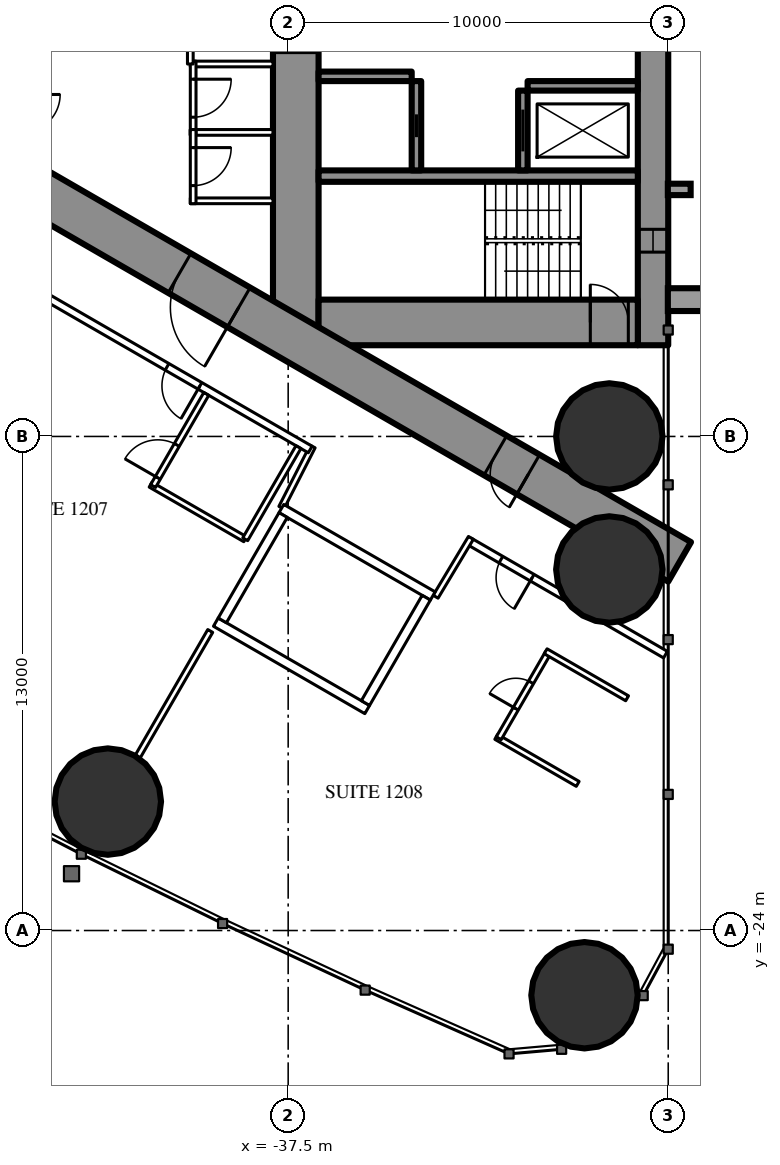
"""IFC4 building model, lengths in metres.
Left out: names, types, materials, properties, quantities, classifications, styles, units other than length and angle.
Written with IfcOpenShell. Run it as: python <this file> out.ifc"""

import sys

from ifc_helpers import new_model, si_unit, direction, frame, frame_2d, origin, origin_2d, place, context, subcontext, project, spatial, rectangle, hollow_circle, extrude, element, fill, save


model = new_model("IFC4")
c1 = context("Model", 3, precision=1e-05, world=origin(), true_north=direction((0.0, 1.0)))
c2 = subcontext(c1, "Body", "Model", "MODEL_VIEW")
j1 = project(units=[si_unit("LENGTHUNIT", "METRE"), si_unit("PLANEANGLEUNIT", "RADIAN")], contexts=[c1])
p1 = place(None, origin())
s1 = spatial("IfcSite", under=j1, at=p1, CompositionType="ELEMENT")
p2 = place(p1, origin())
s2 = spatial("IfcBuilding", under=s1, at=p2, CompositionType="ELEMENT")
p3 = place(p2, frame((0.0, 0.0, 49.5)))
s3 = spatial("IfcBuildingStorey", under=s2, at=p3, CompositionType="ELEMENT", Elevation=49.5)
for number, where, z_axis, x_axis in (
    (1, (-29.703, -25.703, 0.0), (0.0, 0.0, 1.0), (1.0, 0.0, 0.0)),
    (2, (-29.05, -11.0, 0.0), (0.0, 0.0, 1.0), (1.0, 0.0, 0.0)),
    (3, (-29.05, -14.5, 0.0), (0.0, 0.0, 1.0), (1.0, 0.0, 0.0)),
    (4, (-42.245, -20.607, 0.0), (0.0, 0.0, 1.0), (1.0, 0.0, 0.0)),
):
    element("IfcColumn", number, at=place(p3, frame(where, z_axis=z_axis, x_axis=x_axis)), inside=s3, PredefinedType="COLUMN", context=c2, shape_type="SweptSolid", body=[
        extrude(hollow_circle(Radius=1.4, WallThickness=0.12, at=origin_2d()), origin(), (0.0, 0.0, 1.0), 3.5),
    ])
p4 = place(p3, frame((-27.9, 8.6, 0.0), z_axis=(0.0, 0.0, 1.0), x_axis=(0.0, -1.0, 0.0)))
e5 = element("IfcWall", 5, at=p4, inside=s3, PredefinedType="SHEAR", context=c2, shape_type="SweptSolid", body=[
    extrude(rectangle(XDim=17.2, YDim=0.8, at=frame_2d((8.6, 0.0))), origin(), (0.0, 0.0, 1.0), 3.5),
])
p5 = place(p4, frame((2.45, 0.0, 0.6)))
e6 = element("IfcOpeningElement", 6, at=p5, cuts=e5, PredefinedType="OPENING", context=c2, shape_type="SweptSolid", body=[
    extrude(rectangle(XDim=0.6, YDim=2.1, at=frame_2d((0.3, 1.05))), frame((0.0, 0.41, 0.0), z_axis=(0.0, -1.0, 0.0), x_axis=(1.0, 0.0, 0.0)), (0.0, 0.0, 1.0), 0.82),
])
p6 = place(p4, frame((14.15, 0.0, 0.6)))
e7 = element("IfcOpeningElement", 7, at=p6, cuts=e5, PredefinedType="OPENING", context=c2, shape_type="SweptSolid", body=[
    extrude(rectangle(XDim=0.6, YDim=2.1, at=frame_2d((0.3, 1.05))), frame((0.0, 0.41, 0.0), z_axis=(0.0, -1.0, 0.0), x_axis=(1.0, 0.0, 0.0)), (0.0, 0.0, 1.0), 0.82),
])
p7 = place(p3, frame((-37.3, 8.6, 0.0), z_axis=(0.0, 0.0, 1.0), x_axis=(0.0, -1.0, 0.0)))
e8 = element("IfcWall", 8, at=p7, inside=s3, PredefinedType="SHEAR", context=c2, shape_type="SweptSolid", body=[
    extrude(rectangle(XDim=17.2, YDim=1.2, at=frame_2d((8.6, 0.0))), origin(), (0.0, 0.0, 1.0), 3.5),
])
p8 = place(p7, frame((7.7, 0.0, 0.0)))
e9 = element("IfcOpeningElement", 9, at=p8, cuts=e8, PredefinedType="OPENING", context=c2, shape_type="SweptSolid", body=[
    extrude(rectangle(XDim=1.8, YDim=2.2, at=frame_2d((0.9, 1.1))), frame((0.0, 0.61, 0.0), z_axis=(0.0, -1.0, 0.0), x_axis=(1.0, 0.0, 0.0)), (0.0, 0.0, 1.0), 1.22),
])
p9 = place(p3, frame((-28.3, -8.0, 0.0), z_axis=(0.0, 0.0, 1.0), x_axis=(-1.0, 0.0, 0.0)))
e10 = element("IfcWall", 10, at=p9, inside=s3, PredefinedType="SHEAR", context=c2, shape_type="SweptSolid", body=[
    extrude(rectangle(XDim=8.4, YDim=1.2, at=frame_2d((4.2, 0.0))), origin(), (0.0, 0.0, 1.0), 3.5),
])
p10 = place(p9, frame((0.25, 0.0, 0.0)))
e11 = element("IfcOpeningElement", 11, at=p10, cuts=e10, PredefinedType="OPENING", context=c2, shape_type="SweptSolid", body=[
    extrude(rectangle(XDim=1.0, YDim=2.2, at=frame_2d((0.5, 1.1))), frame((0.0, 0.61, 0.0), z_axis=(0.0, -1.0, 0.0), x_axis=(1.0, 0.0, 0.0)), (0.0, 0.0, 1.0), 1.22),
])
p11 = place(p3, frame((-28.3, -4.15, 0.0), z_axis=(0.0, 0.0, 1.0), x_axis=(-1.0, 0.0, 0.0)))
e12 = element("IfcWall", 12, at=p11, inside=s3, PredefinedType="SHEAR", context=c2, shape_type="SweptSolid", body=[
    extrude(rectangle(XDim=8.4, YDim=0.3, at=frame_2d((4.2, 0.0))), origin(), (0.0, 0.0, 1.0), 3.5),
])
p12 = place(p3, frame((-31.325, -1.9, 0.0), z_axis=(0.0, 0.0, 1.0), x_axis=(0.0, -1.0, 0.0)))
e13 = element("IfcWall", 13, at=p12, inside=s3, PredefinedType="SHEAR", context=c2, shape_type="SweptSolid", body=[
    extrude(rectangle(XDim=2.1, YDim=0.25, at=frame_2d((1.05, 0.0))), origin(), (0.0, 0.0, 1.0), 3.5),
])
p13 = place(p12, frame((0.5, 0.0, 0.0)))
e14 = element("IfcOpeningElement", 14, at=p13, cuts=e13, PredefinedType="OPENING", context=c2, shape_type="SweptSolid", body=[
    extrude(rectangle(XDim=1.1, YDim=2.2, at=frame_2d((0.55, 1.1))), frame((0.0, 0.135, 0.0), z_axis=(0.0, -1.0, 0.0), x_axis=(1.0, 0.0, 0.0)), (0.0, 0.0, 1.0), 0.27),
])
p14 = place(p3, frame((-34.125, -1.65, 0.0), z_axis=(0.0, 0.0, 1.0), x_axis=(0.0, -1.0, 0.0)))
e15 = element("IfcWall", 15, at=p14, inside=s3, PredefinedType="SHEAR", context=c2, shape_type="SweptSolid", body=[
    extrude(rectangle(XDim=2.35, YDim=0.25, at=frame_2d((1.175, 0.0))), origin(), (0.0, 0.0, 1.0), 3.5),
])
p15 = place(p14, frame((0.875, 0.0, 0.0)))
e16 = element("IfcOpeningElement", 16, at=p15, cuts=e15, PredefinedType="OPENING", context=c2, shape_type="SweptSolid", body=[
    extrude(rectangle(XDim=0.6, YDim=2.0, at=frame_2d((0.3, 1.0))), frame((0.0, 0.135, 0.0), z_axis=(0.0, -1.0, 0.0), x_axis=(1.0, 0.0, 0.0)), (0.0, 0.0, 1.0), 0.27),
])
p16 = place(p3, frame((-28.3, -1.775, 0.0), z_axis=(0.0, 0.0, 1.0), x_axis=(-1.0, 0.0, 0.0)))
e17 = element("IfcWall", 17, at=p16, inside=s3, PredefinedType="SHEAR", context=c2, shape_type="SweptSolid", body=[
    extrude(rectangle(XDim=2.9, YDim=0.25, at=frame_2d((1.45, 0.0))), origin(), (0.0, 0.0, 1.0), 3.5),
])
p17 = place(p3, frame((-34.25, -1.525, 0.0), z_axis=(0.0, 0.0, 1.0), x_axis=(-1.0, 0.0, 0.0)))
e18 = element("IfcWall", 18, at=p17, inside=s3, PredefinedType="SHEAR", context=c2, shape_type="SweptSolid", body=[
    extrude(rectangle(XDim=2.45, YDim=0.25, at=frame_2d((1.225, 0.0))), origin(), (0.0, 0.0, 1.0), 3.5),
])
p18 = place(p3, frame((-27.2, -14.3, 0.0), z_axis=(0.0, 0.0, 1.0), x_axis=(-0.866024021859, 0.500002393557, 0.0)))
e19 = element("IfcWall", 19, at=p18, inside=s3, PredefinedType="SHEAR", context=c2, shape_type="SweptSolid", body=[
    extrude(rectangle(XDim=27.907, YDim=1.2, at=frame_2d((13.954, 0.0))), origin(), (0.0, 0.0, 1.0), 3.5),
])
p19 = place(p18, frame((4.6, 0.0, 0.0)))
e20 = element("IfcOpeningElement", 20, at=p19, cuts=e19, PredefinedType="OPENING", context=c2, shape_type="SweptSolid", body=[
    extrude(rectangle(XDim=1.0, YDim=2.2, at=frame_2d((0.5, 1.1))), frame((0.0, 0.61, 0.0), z_axis=(0.0, -1.0, 0.0), x_axis=(1.0, 0.0, 0.0)), (0.0, 0.0, 1.0), 1.22),
])
p20 = place(p18, frame((13.395, 0.0, 0.0)))
e21 = element("IfcOpeningElement", 21, at=p20, cuts=e19, PredefinedType="OPENING", context=c2, shape_type="SweptSolid", body=[
    extrude(rectangle(XDim=1.8, YDim=2.2, at=frame_2d((0.9, 1.1))), frame((0.0, 0.61, 0.0), z_axis=(0.0, -1.0, 0.0), x_axis=(1.0, 0.0, 0.0)), (0.0, 0.0, 1.0), 1.22),
])
p21 = place(p3, frame((-39.551, -16.118, 0.0), z_axis=(0.0, 0.0, 1.0), x_axis=(-0.499986503906, -0.866033195618, 0.0)))
e22 = element("IfcWall", 22, at=p21, inside=s3, PredefinedType="PARTITIONING", context=c2, shape_type="SweptSolid", body=[
    extrude(rectangle(XDim=3.815, YDim=0.15, at=frame_2d((1.907, 0.0))), origin(), (0.0, 0.0, 1.0), 3.25),
])
p22 = place(p3, frame((-27.572, -16.741, 0.0), z_axis=(0.0, 0.0, 1.0), x_axis=(-0.866024464444, 0.500001626982, 0.0)))
e23 = element("IfcWall", 23, at=p22, inside=s3, PredefinedType="PARTITIONING", context=c2, shape_type="SweptSolid", body=[
    extrude(rectangle(XDim=5.955, YDim=0.2, at=frame_2d((2.978, 0.0))), origin(), (0.0, 0.0, 1.0), 3.25),
])
p23 = place(p22, frame((4.05, 0.0, 0.0)))
e24 = element("IfcOpeningElement", 24, at=p23, cuts=e23, PredefinedType="OPENING", context=c2, shape_type="SweptSolid", body=[
    extrude(rectangle(XDim=0.95, YDim=2.2, at=frame_2d((0.475, 1.1))), frame((0.0, 0.11, 0.0), z_axis=(0.0, -1.0, 0.0), x_axis=(1.0, 0.0, 0.0)), (0.0, 0.0, 1.0), 0.22),
])
p24 = place(p3, frame((-36.857, -11.265, 0.0), z_axis=(0.0, 0.0, 1.0), x_axis=(-0.454225294761, -0.890886851176, 0.0)))
e25 = element("IfcWall", 25, at=p24, inside=s3, PredefinedType="PARTITIONING", context=c2, shape_type="SweptSolid", body=[
    extrude(rectangle(XDim=1.807, YDim=0.15, at=frame_2d((0.904, 0.0))), origin(), (0.0, 0.0, 1.0), 3.25),
])
p25 = place(p3, frame((-33.621, -15.218, 0.0), z_axis=(0.0, 0.0, 1.0), x_axis=(0.514336634837, 0.857588377991, 0.0)))
e26 = element("IfcWall", 26, at=p25, inside=s3, PredefinedType="PARTITIONING", context=c2, shape_type="SweptSolid", body=[
    extrude(rectangle(XDim=1.805, YDim=0.15, at=frame_2d((0.903, 0.0))), origin(), (0.0, 0.0, 1.0), 3.25),
])
p26 = place(p3, frame((-36.92, -11.344, 0.0), z_axis=(0.0, 0.0, 1.0), x_axis=(-0.866025017052, 0.500000669839, 0.0)))
e27 = element("IfcWall", 27, at=p26, inside=s3, PredefinedType="PARTITIONING", context=c2, shape_type="SweptSolid", body=[
    extrude(rectangle(XDim=12.28, YDim=0.2, at=frame_2d((6.14, 0.0))), origin(), (0.0, 0.0, 1.0), 3.25),
])
p27 = place(p26, frame((3.35, 0.0, 0.0)))
e28 = element("IfcOpeningElement", 28, at=p27, cuts=e27, PredefinedType="OPENING", context=c2, shape_type="SweptSolid", body=[
    extrude(rectangle(XDim=1.0, YDim=2.2, at=frame_2d((0.5, 1.1))), frame((0.0, 0.11, 0.0), z_axis=(0.0, -1.0, 0.0), x_axis=(1.0, 0.0, 0.0)), (0.0, 0.0, 1.0), 0.22),
])
p28 = place(p3, frame((-38.63, -13.705, 0.0), z_axis=(0.0, 0.0, 1.0), x_axis=(-0.866018712932, 0.500011588718, 0.0)))
e29 = element("IfcWall", 29, at=p28, inside=s3, PredefinedType="PARTITIONING", context=c2, shape_type="SweptSolid", body=[
    extrude(rectangle(XDim=2.875, YDim=0.15, at=frame_2d((1.438, 0.0))), origin(), (0.0, 0.0, 1.0), 3.25),
])
p29 = place(p3, frame((-39.655, -9.88, 0.0), z_axis=(0.0, 0.0, 1.0), x_axis=(-0.500049511043, -0.865996816683, 0.0)))
e30 = element("IfcWall", 30, at=p29, inside=s3, PredefinedType="PARTITIONING", context=c2, shape_type="SweptSolid", body=[
    extrude(rectangle(XDim=2.8, YDim=0.15, at=frame_2d((1.4, 0.0))), origin(), (0.0, 0.0, 1.0), 3.25),
])
p30 = place(p29, frame((1.55, 0.0, 0.0)))
e31 = element("IfcOpeningElement", 31, at=p30, cuts=e30, PredefinedType="OPENING", context=c2, shape_type="SweptSolid", body=[
    extrude(rectangle(XDim=1.0, YDim=2.2, at=frame_2d((0.5, 1.1))), frame((0.0, 0.085, 0.0), z_axis=(0.0, -1.0, 0.0), x_axis=(1.0, 0.0, 0.0)), (0.0, 0.0, 1.0), 0.17),
])
p31 = place(p3, frame((-37.23, -11.281, 0.0), z_axis=(0.0, 0.0, 1.0), x_axis=(-0.500049511043, -0.865996816683, 0.0)))
e32 = element("IfcWall", 32, at=p31, inside=s3, PredefinedType="PARTITIONING", context=c2, shape_type="SweptSolid", body=[
    extrude(rectangle(XDim=2.8, YDim=0.15, at=frame_2d((1.4, 0.0))), origin(), (0.0, 0.0, 1.0), 3.25),
])
p32 = place(p3, frame((-29.882, -20.142, 0.0), z_axis=(0.0, 0.0, 1.0), x_axis=(-0.866031185235, 0.4999899861, 0.0)))
e33 = element("IfcWall", 33, at=p32, inside=s3, PredefinedType="PARTITIONING", context=c2, shape_type="SweptSolid", body=[
    extrude(rectangle(XDim=2.475, YDim=0.15, at=frame_2d((1.238, 0.0))), origin(), (0.0, 0.0, 1.0), 3.25),
])
p33 = place(p3, frame((-30.66, -16.69, 0.0), z_axis=(0.0, 0.0, 1.0), x_axis=(-0.499936506574, -0.866062058628, 0.0)))
e34 = element("IfcWall", 34, at=p33, inside=s3, PredefinedType="PARTITIONING", context=c2, shape_type="SweptSolid", body=[
    extrude(rectangle(XDim=2.6, YDim=0.15, at=frame_2d((1.3, 0.0))), origin(), (0.0, 0.0, 1.0), 3.25),
])
p34 = place(p33, frame((0.9, 0.0, 0.0)))
e35 = element("IfcOpeningElement", 35, at=p34, cuts=e34, PredefinedType="OPENING", context=c2, shape_type="SweptSolid", body=[
    extrude(rectangle(XDim=0.8, YDim=2.2, at=frame_2d((0.4, 1.1))), frame((0.0, 0.085, 0.0), z_axis=(0.0, -1.0, 0.0), x_axis=(1.0, 0.0, 0.0)), (0.0, 0.0, 1.0), 0.17),
])
p35 = place(p3, frame((-28.582, -17.89, 0.0), z_axis=(0.0, 0.0, 1.0), x_axis=(-0.866073894602, 0.499916002032, 0.0)))
e36 = element("IfcWall", 36, at=p35, inside=s3, PredefinedType="PARTITIONING", context=c2, shape_type="SweptSolid", body=[
    extrude(rectangle(XDim=2.475, YDim=0.15, at=frame_2d((1.238, 0.0))), origin(), (0.0, 0.0, 1.0), 3.25),
])
for number, where, z_axis, x_axis in (
    (37, (-37.9, -1.2, 0.0), (0.0, 0.0, 1.0), (-1.0, 0.0, 0.0)),
    (38, (-37.9, -3.0, 0.0), (0.0, 0.0, 1.0), (-1.0, 0.0, 0.0)),
    (39, (-37.9, -4.8, 0.0), (0.0, 0.0, 1.0), (-1.0, 0.0, 0.0)),
):
    element("IfcWall", number, at=place(p3, frame(where, z_axis=z_axis, x_axis=x_axis)), inside=s3, PredefinedType="PARTITIONING", context=c2, shape_type="SweptSolid", body=[
        extrude(rectangle(XDim=2.175, YDim=0.15, at=frame_2d((1.087, 0.0))), origin(), (0.0, 0.0, 1.0), 3.25),
    ])
p36 = place(p3, frame((-40.0, -1.125, 0.0), z_axis=(0.0, 0.0, 1.0), x_axis=(0.0, -1.0, 0.0)))
e40 = element("IfcWall", 40, at=p36, inside=s3, PredefinedType="PARTITIONING", context=c2, shape_type="SweptSolid", body=[
    extrude(rectangle(XDim=1.95, YDim=0.15, at=frame_2d((0.975, 0.0))), origin(), (0.0, 0.0, 1.0), 3.25),
])
p37 = place(p36, frame((0.475, 0.0, 0.0)))
e41 = element("IfcOpeningElement", 41, at=p37, cuts=e40, PredefinedType="OPENING", context=c2, shape_type="SweptSolid", body=[
    extrude(rectangle(XDim=1.0, YDim=2.2, at=frame_2d((0.5, 1.1))), frame((0.0, 0.085, 0.0), z_axis=(0.0, -1.0, 0.0), x_axis=(1.0, 0.0, 0.0)), (0.0, 0.0, 1.0), 0.17),
])
p38 = place(p3, frame((-40.0, -2.925, 0.0), z_axis=(0.0, 0.0, 1.0), x_axis=(0.0, -1.0, 0.0)))
e42 = element("IfcWall", 42, at=p38, inside=s3, PredefinedType="PARTITIONING", context=c2, shape_type="SweptSolid", body=[
    extrude(rectangle(XDim=1.95, YDim=0.15, at=frame_2d((0.975, 0.0))), origin(), (0.0, 0.0, 1.0), 3.25),
])
p39 = place(p38, frame((0.475, 0.0, 0.0)))
e43 = element("IfcOpeningElement", 43, at=p39, cuts=e42, PredefinedType="OPENING", context=c2, shape_type="SweptSolid", body=[
    extrude(rectangle(XDim=1.0, YDim=2.2, at=frame_2d((0.5, 1.1))), frame((0.0, 0.085, 0.0), z_axis=(0.0, -1.0, 0.0), x_axis=(1.0, 0.0, 0.0)), (0.0, 0.0, 1.0), 0.17),
])
p40 = place(p3, frame((-40.075, 6.174, 0.0), z_axis=(0.0, 0.0, 1.0), x_axis=(0.0, -1.0, 0.0)))
e44 = element("IfcWall", 44, at=p40, inside=s3, PredefinedType="PARTITIONING", context=c2, shape_type="SweptSolid", body=[
    extrude(rectangle(XDim=7.374, YDim=0.15, at=frame_2d((3.687, 0.0))), origin(), (0.0, 0.0, 1.0), 3.25),
])
p41 = place(p40, frame((2.787, 0.0, 0.0)))
e45 = element("IfcOpeningElement", 45, at=p41, cuts=e44, PredefinedType="OPENING", context=c2, shape_type="SweptSolid", body=[
    extrude(rectangle(XDim=1.8, YDim=2.2, at=frame_2d((0.9, 1.1))), frame((0.0, 0.085, 0.0), z_axis=(0.0, -1.0, 0.0), x_axis=(1.0, 0.0, 0.0)), (0.0, 0.0, 1.0), 0.17),
])
p42 = place(p3, frame((-33.696, -15.197, 0.0), z_axis=(0.0, 0.0, 1.0), x_axis=(-0.865976953817, 0.500083908417, 0.0)))
e46 = element("IfcWall", 46, at=p42, inside=s3, PredefinedType="PARTITIONING", context=c2, shape_type="SweptSolid", body=[
    extrude(rectangle(XDim=4.599, YDim=0.25, at=frame_2d((2.3, 0.0))), origin(), (0.0, 0.0, 1.0), 3.25),
])
p43 = place(p3, frame((-35.42, -18.186, 0.0), z_axis=(0.0, 0.0, 1.0), x_axis=(-0.865990227814, 0.50006092162, 0.0)))
e47 = element("IfcWall", 47, at=p43, inside=s3, PredefinedType="PARTITIONING", context=c2, shape_type="SweptSolid", body=[
    extrude(rectangle(XDim=4.6, YDim=0.25, at=frame_2d((2.3, 0.0))), origin(), (0.0, 0.0, 1.0), 3.25),
])
p44 = place(p3, frame((-33.866, -15.243, 0.0), z_axis=(0.0, 0.0, 1.0), x_axis=(-0.499929347863, -0.866066190972, 0.0)))
e48 = element("IfcWall", 48, at=p44, inside=s3, PredefinedType="PARTITIONING", context=c2, shape_type="SweptSolid", body=[
    extrude(rectangle(XDim=3.201, YDim=0.25, at=frame_2d((1.6, 0.0))), origin(), (0.0, 0.0, 1.0), 3.25),
])
p45 = place(p3, frame((-37.633, -13.068, 0.0), z_axis=(0.0, 0.0, 1.0), x_axis=(-0.499872130319, -0.866099216793, 0.0)))
e49 = element("IfcWall", 49, at=p45, inside=s3, PredefinedType="PARTITIONING", context=c2, shape_type="SweptSolid", body=[
    extrude(rectangle(XDim=3.2, YDim=0.25, at=frame_2d((1.6, 0.0))), origin(), (0.0, 0.0, 1.0), 3.25),
])
p46 = place(p30, origin())
e50 = element("IfcDoor", 50, at=p46, inside=s3, OperationType="SINGLE_SWING_RIGHT", PredefinedType="DOOR", context=c2, shape_type="SweptSolid", body=[
    extrude(rectangle(XDim=1.0, YDim=2.2, at=frame_2d((0.5, 1.1))), frame((0.0, 0.025, 0.0), z_axis=(0.0, -1.0, 0.0), x_axis=(1.0, 0.0, 0.0)), (0.0, 0.0, 1.0), 0.05),
])
fill(e31, e50)
p47 = place(p27, origin())
e51 = element("IfcDoor", 51, at=p47, inside=s3, OperationType="SINGLE_SWING_LEFT", PredefinedType="DOOR", context=c2, shape_type="SweptSolid", body=[
    extrude(rectangle(XDim=1.0, YDim=2.2, at=frame_2d((0.5, 1.1))), frame((0.0, 0.025, 0.0), z_axis=(0.0, -1.0, 0.0), x_axis=(1.0, 0.0, 0.0)), (0.0, 0.0, 1.0), 0.05),
])
fill(e28, e51)
p48 = place(p34, origin())
e52 = element("IfcDoor", 52, at=p48, inside=s3, OperationType="SINGLE_SWING_RIGHT", PredefinedType="DOOR", context=c2, shape_type="SweptSolid", body=[
    extrude(rectangle(XDim=0.8, YDim=2.2, at=frame_2d((0.4, 1.1))), frame((0.0, 0.025, 0.0), z_axis=(0.0, -1.0, 0.0), x_axis=(1.0, 0.0, 0.0)), (0.0, 0.0, 1.0), 0.05),
])
fill(e35, e52)
p49 = place(p23, origin())
e53 = element("IfcDoor", 53, at=p49, inside=s3, OperationType="SINGLE_SWING_LEFT", PredefinedType="DOOR", context=c2, shape_type="SweptSolid", body=[
    extrude(rectangle(XDim=0.95, YDim=2.2, at=frame_2d((0.475, 1.1))), frame((0.0, 0.025, 0.0), z_axis=(0.0, -1.0, 0.0), x_axis=(1.0, 0.0, 0.0)), (0.0, 0.0, 1.0), 0.05),
])
fill(e24, e53)
p50 = place(p37, origin())
e54 = element("IfcDoor", 54, at=p50, inside=s3, OperationType="SINGLE_SWING_LEFT", PredefinedType="DOOR", context=c2, shape_type="SweptSolid", body=[
    extrude(rectangle(XDim=1.0, YDim=2.2, at=frame_2d((0.5, 1.1))), frame((0.0, 0.025, 0.0), z_axis=(0.0, -1.0, 0.0), x_axis=(1.0, 0.0, 0.0)), (0.0, 0.0, 1.0), 0.05),
])
fill(e41, e54)
p51 = place(p39, origin())
e55 = element("IfcDoor", 55, at=p51, inside=s3, OperationType="SINGLE_SWING_LEFT", PredefinedType="DOOR", context=c2, shape_type="SweptSolid", body=[
    extrude(rectangle(XDim=1.0, YDim=2.2, at=frame_2d((0.5, 1.1))), frame((0.0, 0.025, 0.0), z_axis=(0.0, -1.0, 0.0), x_axis=(1.0, 0.0, 0.0)), (0.0, 0.0, 1.0), 0.05),
])
fill(e43, e55)
p52 = place(p19, origin())
e56 = element("IfcDoor", 56, at=p52, inside=s3, OperationType="SINGLE_SWING_LEFT", PredefinedType="DOOR", context=c2, shape_type="SweptSolid", body=[
    extrude(rectangle(XDim=1.0, YDim=2.2, at=frame_2d((0.5, 1.1))), frame((0.0, 0.025, 0.0), z_axis=(0.0, -1.0, 0.0), x_axis=(1.0, 0.0, 0.0)), (0.0, 0.0, 1.0), 0.05),
])
fill(e20, e56)
p53 = place(p20, origin())
e57 = element("IfcDoor", 57, at=p53, inside=s3, OperationType="DOUBLE_DOOR_SINGLE_SWING", PredefinedType="DOOR", context=c2, shape_type="SweptSolid", body=[
    extrude(rectangle(XDim=1.8, YDim=2.2, at=frame_2d((0.9, 1.1))), frame((0.0, 0.025, 0.0), z_axis=(0.0, -1.0, 0.0), x_axis=(1.0, 0.0, 0.0)), (0.0, 0.0, 1.0), 0.05),
])
fill(e21, e57)
p54 = place(p10, origin())
e58 = element("IfcDoor", 58, at=p54, inside=s3, OperationType="SINGLE_SWING_RIGHT", PredefinedType="DOOR", context=c2, shape_type="SweptSolid", body=[
    extrude(rectangle(XDim=1.0, YDim=2.2, at=frame_2d((0.5, 1.1))), frame((0.0, 0.025, 0.0), z_axis=(0.0, -1.0, 0.0), x_axis=(1.0, 0.0, 0.0)), (0.0, 0.0, 1.0), 0.05),
])
fill(e11, e58)
p55 = place(p13, origin())
e59 = element("IfcDoor", 59, at=p55, inside=s3, OperationType="SLIDING_TO_LEFT", PredefinedType="USERDEFINED", context=c2, shape_type="SweptSolid", body=[
    extrude(rectangle(XDim=1.1, YDim=2.2, at=frame_2d((0.55, 1.1))), frame((0.0, 0.025, 0.0), z_axis=(0.0, -1.0, 0.0), x_axis=(1.0, 0.0, 0.0)), (0.0, 0.0, 1.0), 0.05),
])
fill(e14, e59)
p56 = place(p15, origin())
e60 = element("IfcDoor", 60, at=p56, inside=s3, OperationType="SLIDING_TO_LEFT", PredefinedType="DOOR", context=c2, shape_type="SweptSolid", body=[
    extrude(rectangle(XDim=0.6, YDim=2.0, at=frame_2d((0.3, 1.0))), frame((0.0, 0.025, 0.0), z_axis=(0.0, -1.0, 0.0), x_axis=(1.0, 0.0, 0.0)), (0.0, 0.0, 1.0), 0.05),
])
fill(e16, e60)
p57 = place(p6, origin())
e61 = element("IfcWindow", 61, at=p57, inside=s3, PartitioningType="SINGLE_PANEL", PredefinedType="WINDOW", context=c2, shape_type="SweptSolid", body=[
    extrude(rectangle(XDim=0.6, YDim=2.1, at=frame_2d((0.3, 1.05))), frame((0.0, 0.03, 0.0), z_axis=(0.0, -1.0, 0.0), x_axis=(1.0, 0.0, 0.0)), (0.0, 0.0, 1.0), 0.06),
])
fill(e7, e61)
save(model, sys.argv[1])
